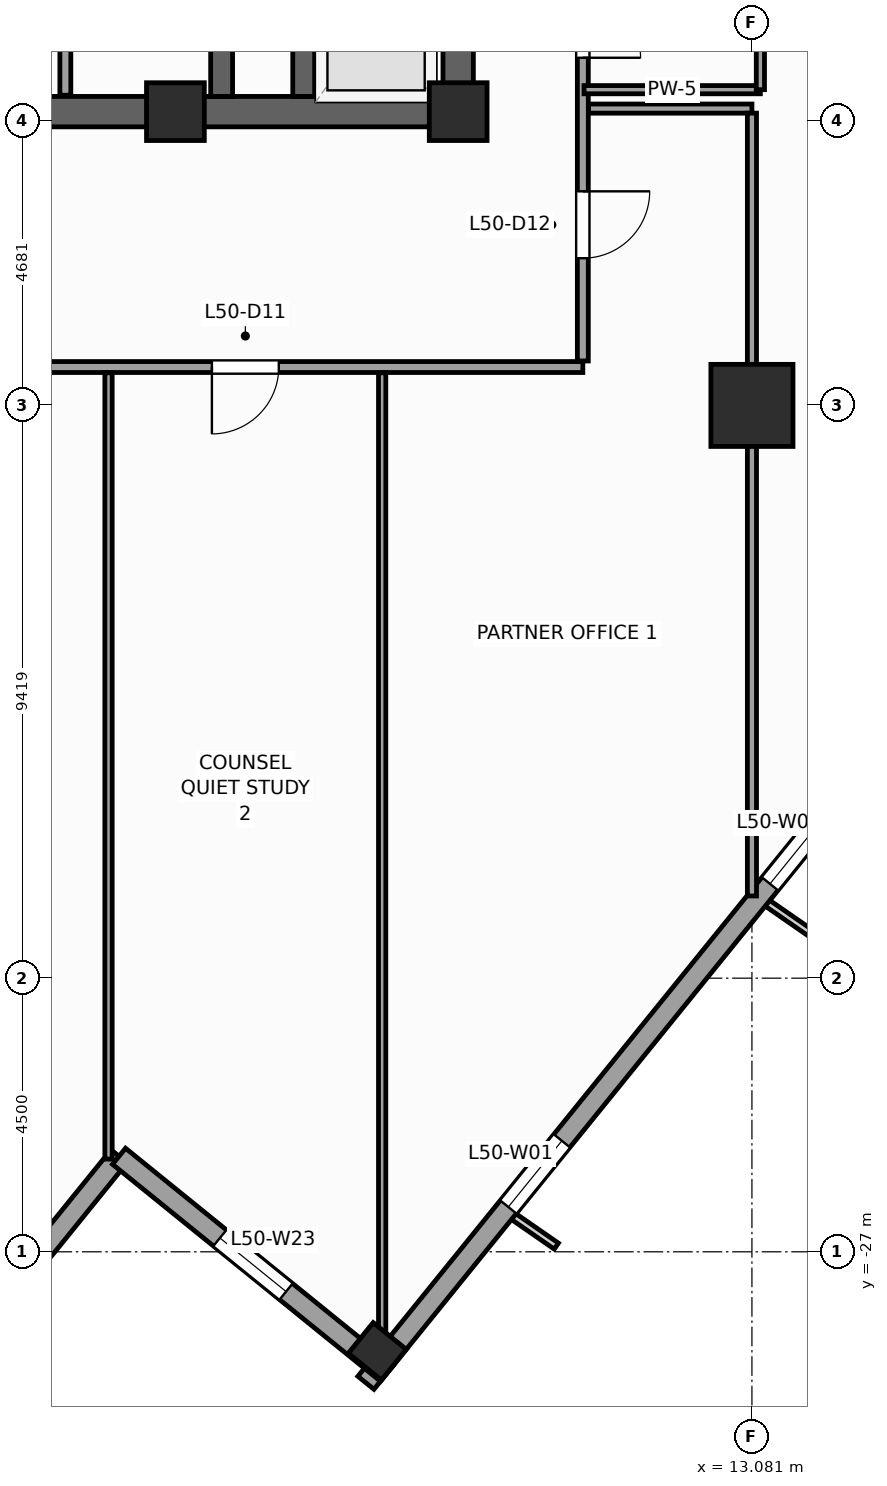
"""IFC4 building model, lengths in metres.
Left out: names, types, materials, properties, quantities, classifications, styles, units other than length and angle.
Written with IfcOpenShell. Run it as: python <this file> out.ifc"""

import sys

from ifc_helpers import new_model, si_unit, direction, frame, frame_2d, origin, origin_2d, place, context, subcontext, project, spatial, rectangle, extrude, source, transform, mapped, element, fill, save


model = new_model("IFC4")
c1 = context("Model", 3, precision=1e-05, world=origin(), true_north=direction((0.0, 1.0)))
c2 = subcontext(c1, "Body", "Model", "MODEL_VIEW")
j1 = project(units=[si_unit("LENGTHUNIT", "METRE"), si_unit("PLANEANGLEUNIT", "RADIAN")], contexts=[c1])
p1 = place(None, origin())
s1 = spatial("IfcSite", under=j1, at=p1, CompositionType="ELEMENT")
p2 = place(p1, origin())
s2 = spatial("IfcBuilding", under=s1, at=p2, CompositionType="ELEMENT")
p3 = place(p2, frame((0.0, 0.0, 209.5)))
s3 = spatial("IfcBuildingStorey", under=s2, at=p3, CompositionType="ELEMENT", Elevation=209.5)
p4 = place(p3, frame((-8.5, -8.25, 0.0), z_axis=(0.0, 0.0, 1.0), x_axis=(1.0, 0.0, 0.0)))
e1 = element("IfcWall", 1, at=p4, inside=s3, PredefinedType="SHEAR", context=c2, shape_type="SweptSolid", body=[
    extrude(rectangle(XDim=17.0, YDim=0.5, at=frame_2d((8.5, 0.0))), origin(), (0.0, 0.0, 1.0), 3.9),
])
p5 = place(p4, frame((7.85, 0.0, 0.0)))
e2 = element("IfcOpeningElement", 2, at=p5, cuts=e1, PredefinedType="OPENING", context=c2, shape_type="SweptSolid", body=[
    extrude(rectangle(XDim=1.3, YDim=2.2, at=frame_2d((0.65, 1.1))), frame((0.0, 0.26, 0.0), z_axis=(0.0, -1.0, 0.0), x_axis=(1.0, 0.0, 0.0)), (0.0, 0.0, 1.0), 0.52),
])
p6 = place(p3, frame((8.25, -8.0, 0.0), z_axis=(0.0, 0.0, 1.0), x_axis=(0.0, 1.0, 0.0)))
e3 = element("IfcWall", 3, at=p6, inside=s3, PredefinedType="SHEAR", context=c2, shape_type="SweptSolid", body=[
    extrude(rectangle(XDim=16.0, YDim=0.5, at=frame_2d((8.0, 0.0))), origin(), (0.0, 0.0, 1.0), 3.9),
])
p7 = place(p6, frame((4.69, 0.0, 0.0)))
e4 = element("IfcOpeningElement", 4, at=p7, cuts=e3, PredefinedType="OPENING", context=c2, shape_type="SweptSolid", body=[
    extrude(rectangle(XDim=1.3, YDim=2.2, at=frame_2d((0.65, 1.1))), frame((0.0, 0.26, 0.0), z_axis=(0.0, -1.0, 0.0), x_axis=(1.0, 0.0, 0.0)), (0.0, 0.0, 1.0), 0.52),
])
p8 = place(p3, frame((4.36, -8.0, 0.0), z_axis=(0.0, 0.0, 1.0), x_axis=(0.0, 1.0, 0.0)))
e5 = element("IfcWall", 5, at=p8, inside=s3, PredefinedType="SHEAR", context=c2, shape_type="SweptSolid", body=[
    extrude(rectangle(XDim=16.0, YDim=0.36, at=frame_2d((8.0, 0.0))), origin(), (0.0, 0.0, 1.0), 3.9),
])
p9 = place(p3, frame((5.71, -8.0, 0.0), z_axis=(0.0, 0.0, 1.0), x_axis=(0.0, 1.0, 0.0)))
e6 = element("IfcWall", 6, at=p9, inside=s3, PredefinedType="SHEAR", context=c2, shape_type="SweptSolid", body=[
    extrude(rectangle(XDim=2.54, YDim=0.36, at=frame_2d((1.27, 0.0))), origin(), (0.0, 0.0, 1.0), 3.9),
])
m1 = source(origin(), c2, "Body", "SweptSolid", [
    extrude(rectangle(XDim=0.95, YDim=0.95, at=origin_2d()), origin(), (0.0, 0.0, 1.0), 3.9),
])
for number, where, z_axis, x_axis in (
    (7, (8.25, -8.25, 0.0), (0.0, 0.0, 1.0), (1.0, 0.0, 0.0)),
    (8, (3.6, -8.25, 0.0), (0.0, 0.0, 1.0), (1.0, 0.0, 0.0)),
):
    element("IfcColumn", number, at=place(p3, frame(where, z_axis=z_axis, x_axis=x_axis)), inside=s3, PredefinedType="PILASTER", context=c2, shape_type="MappedRepresentation", body=[
        mapped(m1, transform((0.0, 0.0, 0.0), scale=1.0)),
    ])
m2 = source(origin(), c2, "Body", "SweptSolid", [
    extrude(rectangle(XDim=1.35, YDim=1.35, at=origin_2d()), origin(), (0.0, 0.0, 1.0), 3.9),
])
p10 = place(p3, frame((13.081, -13.081, 0.0), z_axis=(0.0, 0.0, 1.0), x_axis=(1.0, 0.0, 0.0)))
e9 = element("IfcColumn", 9, at=p10, inside=s3, PredefinedType="COLUMN", context=c2, shape_type="MappedRepresentation", body=[
    mapped(m2, transform((0.0, 0.0, 0.0), scale=1.0)),
])
m3 = source(origin(), c2, "Body", "SweptSolid", [
    extrude(rectangle(XDim=0.65, YDim=0.7, at=origin_2d()), origin(), (0.0, 0.0, 1.0), 3.9),
])
p11 = place(p3, frame((6.92, -28.637, 0.0), z_axis=(0.0, 0.0, 1.0), x_axis=(0.62932039105, 0.777145961457, 0.0)))
e10 = element("IfcColumn", 10, at=p11, inside=s3, PredefinedType="COLUMN", context=c2, shape_type="MappedRepresentation", body=[
    mapped(m3, transform((0.0, 0.0, 0.0), scale=1.0)),
])
p12 = place(p3, frame((6.733, -29.154, 0.0), z_axis=(0.0, 0.0, 1.0), x_axis=(0.629325378072, 0.77714192302, 0.0)))
e11 = element("IfcWall", 11, at=p12, inside=s3, PredefinedType="STANDARD", context=c2, shape_type="SweptSolid", body=[
    extrude(rectangle(XDim=36.84, YDim=0.34, at=frame_2d((18.42, 0.0))), origin(), (0.0, 0.0, 1.0), 2.96),
])
p13 = place(p12, frame((23.495, 0.0, 0.0)))
e12 = element("IfcOpeningElement", 12, at=p13, cuts=e11, PredefinedType="OPENING", context=c2, shape_type="SweptSolid", body=[
    extrude(rectangle(XDim=1.05, YDim=2.25, at=frame_2d((0.525, 1.125))), frame((0.0, 0.18, 0.0), z_axis=(0.0, -1.0, 0.0), x_axis=(1.0, 0.0, 0.0)), (0.0, 0.0, 1.0), 0.36),
])
p14 = place(p12, frame((3.721, 0.0, 0.48)))
e13 = element("IfcOpeningElement", 13, at=p14, cuts=e11, PredefinedType="OPENING", context=c2, shape_type="SweptSolid", body=[
    extrude(rectangle(XDim=1.4, YDim=2.4, at=frame_2d((0.7, 1.2))), frame((0.0, 0.18, 0.0), z_axis=(0.0, -1.0, 0.0), x_axis=(1.0, 0.0, 0.0)), (0.0, 0.0, 1.0), 0.36),
])
p15 = place(p12, frame((10.559, 0.0, 0.58)))
e14 = element("IfcOpeningElement", 14, at=p15, cuts=e11, PredefinedType="OPENING", context=c2, shape_type="SweptSolid", body=[
    extrude(rectangle(XDim=1.75, YDim=2.3, at=frame_2d((0.875, 1.15))), frame((0.0, 0.18, 0.0), z_axis=(0.0, -1.0, 0.0), x_axis=(1.0, 0.0, 0.0)), (0.0, 0.0, 1.0), 0.36),
])
p16 = place(p12, frame((16.058, 0.0, 0.58)))
e15 = element("IfcOpeningElement", 15, at=p16, cuts=e11, PredefinedType="OPENING", context=c2, shape_type="SweptSolid", body=[
    extrude(rectangle(XDim=1.75, YDim=2.3, at=frame_2d((0.875, 1.15))), frame((0.0, 0.18, 0.0), z_axis=(0.0, -1.0, 0.0), x_axis=(1.0, 0.0, 0.0)), (0.0, 0.0, 1.0), 0.36),
])
p17 = place(p12, frame((25.676, 0.0, 0.58)))
e16 = element("IfcOpeningElement", 16, at=p17, cuts=e11, PredefinedType="OPENING", context=c2, shape_type="SweptSolid", body=[
    extrude(rectangle(XDim=1.75, YDim=2.3, at=frame_2d((0.875, 1.15))), frame((0.0, 0.18, 0.0), z_axis=(0.0, -1.0, 0.0), x_axis=(1.0, 0.0, 0.0)), (0.0, 0.0, 1.0), 0.36),
])
p18 = place(p12, frame((30.982, 0.0, 0.48)))
e17 = element("IfcOpeningElement", 17, at=p18, cuts=e11, PredefinedType="OPENING", context=c2, shape_type="SweptSolid", body=[
    extrude(rectangle(XDim=1.4, YDim=2.4, at=frame_2d((0.7, 1.2))), frame((0.0, 0.18, 0.0), z_axis=(0.0, -1.0, 0.0), x_axis=(1.0, 0.0, 0.0)), (0.0, 0.0, 1.0), 0.36),
])
p19 = place(p3, frame((-0.789, -29.703, 0.0), z_axis=(0.0, 0.0, 1.0), x_axis=(0.629323365087, 0.77714355312, 0.0)))
e18 = element("IfcWall", 18, at=p19, inside=s3, PredefinedType="STANDARD", context=c2, shape_type="SweptSolid", body=[
    extrude(rectangle(XDim=5.5, YDim=0.34, at=frame_2d((2.75, 0.0))), origin(), (0.0, 0.0, 1.0), 3.66),
])
p20 = place(p3, frame((2.673, -25.429, 0.0), z_axis=(0.0, 0.0, 1.0), x_axis=(0.777162640055, -0.629299794138, 0.0)))
e19 = element("IfcWall", 19, at=p20, inside=s3, PredefinedType="STANDARD", context=c2, shape_type="SweptSolid", body=[
    extrude(rectangle(XDim=5.67, YDim=0.34, at=frame_2d((2.835, 0.0))), origin(), (0.0, 0.0, 1.0), 3.66),
])
p21 = place(p20, frame((2.135, 0.0, 0.48)))
e20 = element("IfcOpeningElement", 20, at=p21, cuts=e19, PredefinedType="OPENING", context=c2, shape_type="SweptSolid", body=[
    extrude(rectangle(XDim=1.4, YDim=2.4, at=frame_2d((0.7, 1.2))), frame((0.0, 0.18, 0.0), z_axis=(0.0, -1.0, 0.0), x_axis=(1.0, 0.0, 0.0)), (0.0, 0.0, 1.0), 0.36),
])
p22 = place(p3, frame((1.79, -7.98, 0.0), z_axis=(0.0, 0.0, 1.0), x_axis=(0.0, 1.0, 0.0)))
e21 = element("IfcWall", 21, at=p22, inside=s3, PredefinedType="PARTITIONING", context=c2, shape_type="SweptSolid", body=[
    extrude(rectangle(XDim=12.38, YDim=0.18, at=frame_2d((6.19, 0.0))), origin(), (0.0, 0.0, 1.0), 3.66),
])
p23 = place(p22, frame((4.6, 0.0, 0.0)))
e22 = element("IfcOpeningElement", 22, at=p23, cuts=e21, PredefinedType="OPENING", context=c2, shape_type="SweptSolid", body=[
    extrude(rectangle(XDim=1.1, YDim=2.2, at=frame_2d((0.55, 1.1))), frame((0.0, 0.1, 0.0), z_axis=(0.0, -1.0, 0.0), x_axis=(1.0, 0.0, 0.0)), (0.0, 0.0, 1.0), 0.2),
])
p24 = place(p22, frame((6.66, 0.0, 0.0)))
e23 = element("IfcOpeningElement", 23, at=p24, cuts=e21, PredefinedType="OPENING", context=c2, shape_type="SweptSolid", body=[
    extrude(rectangle(XDim=1.1, YDim=2.2, at=frame_2d((0.55, 1.1))), frame((0.0, 0.1, 0.0), z_axis=(0.0, -1.0, 0.0), x_axis=(1.0, 0.0, 0.0)), (0.0, 0.0, 1.0), 0.2),
])
p25 = place(p22, frame((1.4, 0.0, 0.0)))
e24 = element("IfcOpeningElement", 24, at=p25, cuts=e21, PredefinedType="OPENING", context=c2, shape_type="SweptSolid", body=[
    extrude(rectangle(XDim=1.15, YDim=2.25, at=frame_2d((0.575, 1.125))), frame((0.0, 0.1, 0.0), z_axis=(0.0, -1.0, 0.0), x_axis=(1.0, 0.0, 0.0)), (0.0, 0.0, 1.0), 0.2),
])
p26 = place(p3, frame((-11.45, -12.45, 0.0), z_axis=(0.0, 0.0, 1.0), x_axis=(1.0, 0.0, 0.0)))
e25 = element("IfcWall", 25, at=p26, inside=s3, PredefinedType="PARTITIONING", context=c2, shape_type="SweptSolid", body=[
    extrude(rectangle(XDim=21.75, YDim=0.18, at=frame_2d((10.875, 0.0))), origin(), (0.0, 0.0, 1.0), 3.66),
])
p27 = place(p26, frame((5.411, 0.0, 0.0)))
e26 = element("IfcOpeningElement", 26, at=p27, cuts=e25, PredefinedType="OPENING", context=c2, shape_type="SweptSolid", body=[
    extrude(rectangle(XDim=0.95, YDim=2.1, at=frame_2d((0.475, 1.05))), frame((0.0, 0.1, 0.0), z_axis=(0.0, -1.0, 0.0), x_axis=(1.0, 0.0, 0.0)), (0.0, 0.0, 1.0), 0.2),
])
p28 = place(p26, frame((1.839, 0.0, 0.0)))
e27 = element("IfcOpeningElement", 27, at=p28, cuts=e25, PredefinedType="OPENING", context=c2, shape_type="SweptSolid", body=[
    extrude(rectangle(XDim=1.1, YDim=2.2, at=frame_2d((0.55, 1.1))), frame((0.0, 0.1, 0.0), z_axis=(0.0, -1.0, 0.0), x_axis=(1.0, 0.0, 0.0)), (0.0, 0.0, 1.0), 0.2),
])
p29 = place(p26, frame((7.574, 0.0, 0.0)))
e28 = element("IfcOpeningElement", 28, at=p29, cuts=e25, PredefinedType="OPENING", context=c2, shape_type="SweptSolid", body=[
    extrude(rectangle(XDim=1.1, YDim=2.2, at=frame_2d((0.55, 1.1))), frame((0.0, 0.1, 0.0), z_axis=(0.0, -1.0, 0.0), x_axis=(1.0, 0.0, 0.0)), (0.0, 0.0, 1.0), 0.2),
])
p30 = place(p26, frame((11.05, 0.0, 0.0)))
e29 = element("IfcOpeningElement", 29, at=p30, cuts=e25, PredefinedType="OPENING", context=c2, shape_type="SweptSolid", body=[
    extrude(rectangle(XDim=1.1, YDim=2.2, at=frame_2d((0.55, 1.1))), frame((0.0, 0.1, 0.0), z_axis=(0.0, -1.0, 0.0), x_axis=(1.0, 0.0, 0.0)), (0.0, 0.0, 1.0), 0.2),
])
p31 = place(p26, frame((15.65, 0.0, 0.0)))
e30 = element("IfcOpeningElement", 30, at=p31, cuts=e25, PredefinedType="OPENING", context=c2, shape_type="SweptSolid", body=[
    extrude(rectangle(XDim=1.1, YDim=2.2, at=frame_2d((0.55, 1.1))), frame((0.0, 0.1, 0.0), z_axis=(0.0, -1.0, 0.0), x_axis=(1.0, 0.0, 0.0)), (0.0, 0.0, 1.0), 0.2),
])
p32 = place(p3, frame((10.3, -12.35, 0.0), z_axis=(0.0, 0.0, 1.0), x_axis=(0.0, 1.0, 0.0)))
e31 = element("IfcWall", 31, at=p32, inside=s3, PredefinedType="PARTITIONING", context=c2, shape_type="SweptSolid", body=[
    extrude(rectangle(XDim=16.15, YDim=0.18, at=frame_2d((8.075, 0.0))), origin(), (0.0, 0.0, 1.0), 3.66),
])
p33 = place(p32, frame((4.986, 0.0, 0.0)))
e32 = element("IfcOpeningElement", 32, at=p33, cuts=e31, PredefinedType="OPENING", context=c2, shape_type="SweptSolid", body=[
    extrude(rectangle(XDim=0.95, YDim=2.1, at=frame_2d((0.475, 1.05))), frame((0.0, 0.1, 0.0), z_axis=(0.0, -1.0, 0.0), x_axis=(1.0, 0.0, 0.0)), (0.0, 0.0, 1.0), 0.2),
])
p34 = place(p32, frame((14.111, 0.0, 0.0)))
e33 = element("IfcOpeningElement", 33, at=p34, cuts=e31, PredefinedType="OPENING", context=c2, shape_type="SweptSolid", body=[
    extrude(rectangle(XDim=1.1, YDim=2.2, at=frame_2d((0.55, 1.1))), frame((0.0, 0.1, 0.0), z_axis=(0.0, -1.0, 0.0), x_axis=(1.0, 0.0, 0.0)), (0.0, 0.0, 1.0), 0.2),
])
p35 = place(p32, frame((1.689, 0.0, 0.0)))
e34 = element("IfcOpeningElement", 34, at=p35, cuts=e31, PredefinedType="OPENING", context=c2, shape_type="SweptSolid", body=[
    extrude(rectangle(XDim=1.1, YDim=2.2, at=frame_2d((0.55, 1.1))), frame((0.0, 0.1, 0.0), z_axis=(0.0, -1.0, 0.0), x_axis=(1.0, 0.0, 0.0)), (0.0, 0.0, 1.0), 0.2),
])
p36 = place(p32, frame((7.65, 0.0, 0.0)))
e35 = element("IfcOpeningElement", 35, at=p36, cuts=e31, PredefinedType="OPENING", context=c2, shape_type="SweptSolid", body=[
    extrude(rectangle(XDim=1.1, YDim=2.2, at=frame_2d((0.55, 1.1))), frame((0.0, 0.1, 0.0), z_axis=(0.0, -1.0, 0.0), x_axis=(1.0, 0.0, 0.0)), (0.0, 0.0, 1.0), 0.2),
])
p37 = place(p32, frame((11.175, 0.0, 0.0)))
e36 = element("IfcOpeningElement", 36, at=p37, cuts=e31, PredefinedType="OPENING", context=c2, shape_type="SweptSolid", body=[
    extrude(rectangle(XDim=1.1, YDim=2.2, at=frame_2d((0.55, 1.1))), frame((0.0, 0.1, 0.0), z_axis=(0.0, -1.0, 0.0), x_axis=(1.0, 0.0, 0.0)), (0.0, 0.0, 1.0), 0.2),
])
p38 = place(p3, frame((2.5, -25.475, 0.0), z_axis=(0.0, 0.0, 1.0), x_axis=(0.0, 1.0, 0.0)))
e37 = element("IfcWall", 37, at=p38, inside=s3, PredefinedType="PARTITIONING", context=c2, shape_type="SweptSolid", body=[
    extrude(rectangle(XDim=12.93, YDim=0.12, at=frame_2d((6.465, 0.0))), origin(), (0.0, 0.0, 1.0), 3.66),
])
p39 = place(p3, frame((7.0, -28.658, 0.0), z_axis=(0.0, 0.0, 1.0), x_axis=(0.0, 1.0, 0.0)))
e38 = element("IfcWall", 38, at=p39, inside=s3, PredefinedType="PARTITIONING", context=c2, shape_type="SweptSolid", body=[
    extrude(rectangle(XDim=16.113, YDim=0.12, at=frame_2d((8.057, 0.0))), origin(), (0.0, 0.0, 1.0), 2.96),
])
p40 = place(p3, frame((10.395, -8.2, 0.0), z_axis=(0.0, 0.0, 1.0), x_axis=(1.0, 0.0, 0.0)))
e39 = element("IfcWall", 39, at=p40, inside=s3, PredefinedType="PARTITIONING", context=c2, shape_type="SweptSolid", body=[
    extrude(rectangle(XDim=2.686, YDim=0.15, at=frame_2d((1.343, 0.0))), origin(), (0.0, 0.0, 1.0), 3.66),
])
p41 = place(p3, frame((13.081, -8.275, 0.0), z_axis=(0.0, 0.0, 1.0), x_axis=(0.0, -1.0, 0.0)))
e40 = element("IfcWall", 40, at=p41, inside=s3, PredefinedType="PARTITIONING", context=c2, shape_type="SweptSolid", body=[
    extrude(rectangle(XDim=12.874, YDim=0.15, at=frame_2d((6.437, 0.0))), origin(), (0.0, 0.0, 1.0), 2.76),
])
p42 = place(p3, frame((10.32, -7.889, 0.0), z_axis=(0.0, 0.0, 1.0), x_axis=(1.0, 0.0, 0.0)))
e41 = element("IfcWall", 41, at=p42, inside=s3, PredefinedType="PARTITIONING", context=c2, shape_type="SweptSolid", body=[
    extrude(rectangle(XDim=2.9, YDim=0.135, at=frame_2d((1.45, 0.0))), origin(), (0.0, 0.0, 1.0), 3.66),
])
p43 = place(p3, frame((13.22, -7.889, 0.0), z_axis=(0.0, 0.0, 1.0), x_axis=(0.0, 1.0, 0.0)))
e42 = element("IfcWall", 42, at=p43, inside=s3, PredefinedType="PARTITIONING", context=c2, shape_type="SweptSolid", body=[
    extrude(rectangle(XDim=2.0, YDim=0.135, at=frame_2d((1.0, 0.0))), origin(), (0.0, 0.0, 1.0), 2.76),
])
m4 = source(origin(), c2, "Body", "SweptSolid", [
    extrude(rectangle(XDim=1.4, YDim=2.4, at=frame_2d((0.7, 1.2))), frame((0.0, 0.03, 0.0), z_axis=(0.0, -1.0, 0.0), x_axis=(1.0, 0.0, 0.0)), (0.0, 0.0, 1.0), 0.06),
])
p44 = place(p14, origin())
e43 = element("IfcWindow", 43, at=p44, inside=s3, PartitioningType="SINGLE_PANEL", PredefinedType="WINDOW", context=c2, shape_type="MappedRepresentation", body=[
    mapped(m4, transform((0.0, 0.0, 0.0), scale=1.0)),
])
fill(e13, e43)
m5 = source(origin(), c2, "Body", "SweptSolid", [
    extrude(rectangle(XDim=1.75, YDim=2.3, at=frame_2d((0.875, 1.15))), frame((0.0, 0.03, 0.0), z_axis=(0.0, -1.0, 0.0), x_axis=(1.0, 0.0, 0.0)), (0.0, 0.0, 1.0), 0.06),
])
p45 = place(p15, origin())
e44 = element("IfcWindow", 44, at=p45, inside=s3, PartitioningType="SINGLE_PANEL", PredefinedType="WINDOW", context=c2, shape_type="MappedRepresentation", body=[
    mapped(m5, transform((0.0, 0.0, 0.0), scale=1.0)),
])
fill(e14, e44)
p46 = place(p21, origin())
e45 = element("IfcWindow", 45, at=p46, inside=s3, PartitioningType="SINGLE_PANEL", PredefinedType="WINDOW", context=c2, shape_type="MappedRepresentation", body=[
    mapped(m4, transform((0.0, 0.0, 0.0), scale=1.0)),
])
fill(e20, e45)
m6 = source(origin(), c2, "Body", "SweptSolid", [
    extrude(rectangle(XDim=0.95, YDim=2.1, at=frame_2d((0.475, 1.05))), frame((0.0, 0.025, 0.0), z_axis=(0.0, -1.0, 0.0), x_axis=(1.0, 0.0, 0.0)), (0.0, 0.0, 1.0), 0.05),
])
p47 = place(p33, frame((0.95, 0.0, 0.0), z_axis=(0.0, 0.0, 1.0), x_axis=(-1.0, 0.0, 0.0)))
e46 = element("IfcDoor", 46, at=p47, inside=s3, OperationType="SINGLE_SWING_LEFT", PredefinedType="DOOR", context=c2, shape_type="MappedRepresentation", body=[
    mapped(m6, transform((0.0, 0.0, 0.0), scale=1.0)),
])
fill(e32, e46)
m7 = source(origin(), c2, "Body", "SweptSolid", [
    extrude(rectangle(XDim=1.1, YDim=2.2, at=frame_2d((0.55, 1.1))), frame((0.0, 0.025, 0.0), z_axis=(0.0, -1.0, 0.0), x_axis=(1.0, 0.0, 0.0)), (0.0, 0.0, 1.0), 0.05),
])
p48 = place(p31, frame((1.1, 0.0, 0.0), z_axis=(0.0, 0.0, 1.0), x_axis=(-1.0, 0.0, 0.0)))
e47 = element("IfcDoor", 47, at=p48, inside=s3, OperationType="SINGLE_SWING_LEFT", PredefinedType="DOOR", context=c2, shape_type="MappedRepresentation", body=[
    mapped(m7, transform((0.0, 0.0, 0.0), scale=1.0)),
])
fill(e30, e47)
p49 = place(p35, frame((1.1, 0.0, 0.0), z_axis=(0.0, 0.0, 1.0), x_axis=(-1.0, 0.0, 0.0)))
e48 = element("IfcDoor", 48, at=p49, inside=s3, OperationType="SINGLE_SWING_RIGHT", PredefinedType="DOOR", context=c2, shape_type="MappedRepresentation", body=[
    mapped(m7, transform((0.0, 0.0, 0.0), scale=1.0)),
])
fill(e34, e48)
save(model, sys.argv[1])
